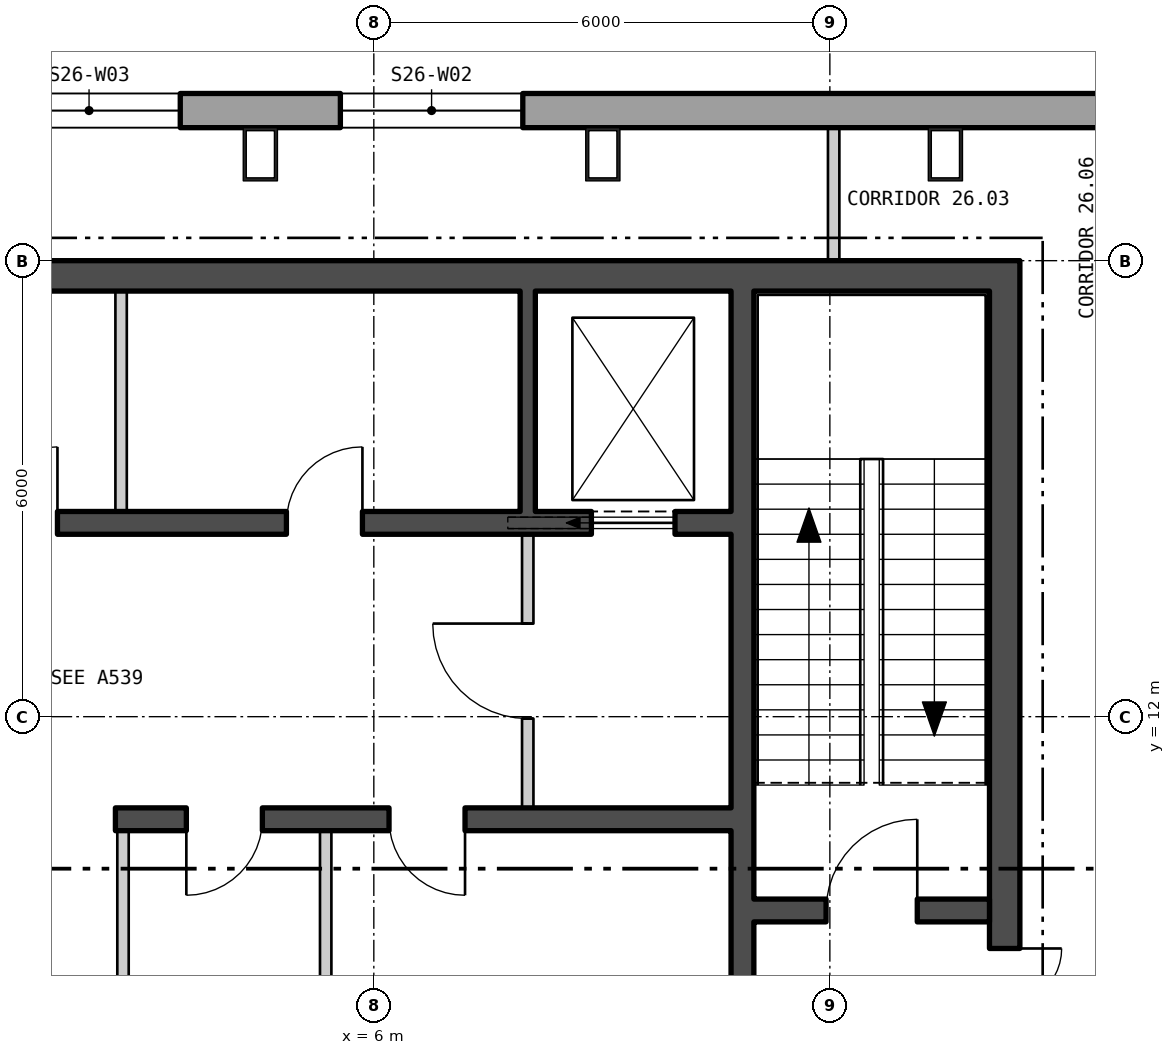
"""IFC4 building model, lengths in metres.
Left out: names, types, materials, properties, quantities, classifications, styles, units other than length and angle.
Written with IfcOpenShell. Run it as: python <this file> out.ifc"""

import sys

from ifc_helpers import new_model, si_unit, direction, frame, frame_2d, origin, origin_2d, place, context, subcontext, project, spatial, polyline, rectangle, hollow_rectangle, outline, extrude, element, fill, save


model = new_model("IFC4")
c1 = context("Model", 3, precision=1e-05, world=origin(), true_north=direction((0.0, 1.0)))
c2 = subcontext(c1, "Body", "Model", "MODEL_VIEW")
j1 = project(units=[si_unit("LENGTHUNIT", "METRE"), si_unit("PLANEANGLEUNIT", "RADIAN")], contexts=[c1])
p1 = place(None, origin())
s1 = spatial("IfcSite", under=j1, at=p1, CompositionType="ELEMENT")
p2 = place(p1, origin())
s2 = spatial("IfcBuilding", under=s1, at=p2, CompositionType="ELEMENT")
p3 = place(p2, frame((0.0, 0.0, 329.4)))
s3 = spatial("IfcBuildingStorey", under=s2, at=p3, CompositionType="ELEMENT", Elevation=329.4)
for number, where, z_axis, x_axis in (
    (1, (13.52, 19.4, 0.0), (0.0, 0.0, 1.0), (-1.0, 0.0, 0.0)),
    (2, (9.013, 19.4, 0.0), (0.0, 0.0, 1.0), (-1.0, 0.0, 0.0)),
    (3, (4.507, 19.4, 0.0), (0.0, 0.0, 1.0), (-1.0, 0.0, 0.0)),
):
    element("IfcColumn", number, at=place(p3, frame(where, z_axis=z_axis, x_axis=x_axis)), inside=s3, PredefinedType="COLUMN", context=c2, shape_type="SweptSolid", body=[
        extrude(hollow_rectangle(XDim=0.45, YDim=0.7, WallThickness=0.04, at=origin_2d()), origin(), (0.0, 0.0, 1.0), 4.2),
    ])
p4 = place(p3, frame((22.865, 19.975, -0.4), z_axis=(0.0, 0.0, 1.0), x_axis=(-1.0, 0.0, 0.0)))
e4 = element("IfcWall", 4, at=p4, inside=s3, PredefinedType="SOLIDWALL", context=c2, shape_type="SweptSolid", body=[
    extrude(outline(polyline([(-0.13, -0.225), (45.86, -0.225), (45.6, 0.225), (0.13, 0.225), (-0.13, -0.225)])), origin(), (0.0, 0.0, 1.0), 4.2),
])
p5 = place(p4, frame((1.424, 0.0, 1.3)))
e5 = element("IfcOpeningElement", 5, at=p5, cuts=e4, PredefinedType="OPENING", context=c2, shape_type="SweptSolid", body=[
    extrude(rectangle(XDim=2.4, YDim=2.3, at=frame_2d((1.2, 1.15))), frame((0.0, 0.235, 0.0), z_axis=(0.0, -1.0, 0.0), x_axis=(1.0, 0.0, 0.0)), (0.0, 0.0, 1.0), 0.47),
])
p6 = place(p4, frame((14.905, 0.0, 1.3)))
e6 = element("IfcOpeningElement", 6, at=p6, cuts=e4, PredefinedType="OPENING", context=c2, shape_type="SweptSolid", body=[
    extrude(rectangle(XDim=2.4, YDim=2.3, at=frame_2d((1.2, 1.15))), frame((0.0, 0.235, 0.0), z_axis=(0.0, -1.0, 0.0), x_axis=(1.0, 0.0, 0.0)), (0.0, 0.0, 1.0), 0.47),
])
p7 = place(p4, frame((19.412, 0.0, 1.3)))
e7 = element("IfcOpeningElement", 7, at=p7, cuts=e4, PredefinedType="OPENING", context=c2, shape_type="SweptSolid", body=[
    extrude(rectangle(XDim=2.4, YDim=2.3, at=frame_2d((1.2, 1.15))), frame((0.0, 0.235, 0.0), z_axis=(0.0, -1.0, 0.0), x_axis=(1.0, 0.0, 0.0)), (0.0, 0.0, 1.0), 0.47),
])
p8 = place(p4, frame((23.918, 0.0, 1.3)))
e8 = element("IfcOpeningElement", 8, at=p8, cuts=e4, PredefinedType="OPENING", context=c2, shape_type="SweptSolid", body=[
    extrude(rectangle(XDim=2.4, YDim=2.3, at=frame_2d((1.2, 1.15))), frame((0.0, 0.235, 0.0), z_axis=(0.0, -1.0, 0.0), x_axis=(1.0, 0.0, 0.0)), (0.0, 0.0, 1.0), 0.47),
])
p9 = place(p4, frame((28.425, 0.0, 1.3)))
e9 = element("IfcOpeningElement", 9, at=p9, cuts=e4, PredefinedType="OPENING", context=c2, shape_type="SweptSolid", body=[
    extrude(rectangle(XDim=2.4, YDim=2.3, at=frame_2d((1.2, 1.15))), frame((0.0, 0.235, 0.0), z_axis=(0.0, -1.0, 0.0), x_axis=(1.0, 0.0, 0.0)), (0.0, 0.0, 1.0), 0.47),
])
p10 = place(p4, frame((32.932, 0.0, 1.3)))
e10 = element("IfcOpeningElement", 10, at=p10, cuts=e4, PredefinedType="OPENING", context=c2, shape_type="SweptSolid", body=[
    extrude(rectangle(XDim=2.4, YDim=2.3, at=frame_2d((1.2, 1.15))), frame((0.0, 0.235, 0.0), z_axis=(0.0, -1.0, 0.0), x_axis=(1.0, 0.0, 0.0)), (0.0, 0.0, 1.0), 0.47),
])
p11 = place(p4, frame((41.907, 0.0, 1.3)))
e11 = element("IfcOpeningElement", 11, at=p11, cuts=e4, PredefinedType="OPENING", context=c2, shape_type="SweptSolid", body=[
    extrude(rectangle(XDim=2.4, YDim=2.3, at=frame_2d((1.2, 1.15))), frame((0.0, 0.235, 0.0), z_axis=(0.0, -1.0, 0.0), x_axis=(1.0, 0.0, 0.0)), (0.0, 0.0, 1.0), 0.47),
])
p12 = place(p3, frame((1.9, -22.92, -0.18), z_axis=(0.0, 0.0, 1.0), x_axis=(0.500000141277, 0.866025322218, 0.0)))
e12 = element("IfcWall", 12, at=p12, inside=s3, PredefinedType="SOLIDWALL", context=c2, shape_type="SweptSolid", body=[
    extrude(outline(polyline([(-0.13, -0.225), (45.86, -0.225), (45.6, 0.225), (0.13, 0.225), (-0.13, -0.225)])), origin(), (0.0, 0.0, 1.0), 3.98),
])
p13 = place(p12, frame((1.424, 0.0, 1.08)))
e13 = element("IfcOpeningElement", 13, at=p13, cuts=e12, PredefinedType="OPENING", context=c2, shape_type="SweptSolid", body=[
    extrude(rectangle(XDim=2.4, YDim=2.3, at=frame_2d((1.2, 1.15))), frame((0.0, 0.235, 0.0), z_axis=(0.0, -1.0, 0.0), x_axis=(1.0, 0.0, 0.0)), (0.0, 0.0, 1.0), 0.47),
])
p14 = place(p12, frame((5.892, 0.0, 1.08)))
e14 = element("IfcOpeningElement", 14, at=p14, cuts=e12, PredefinedType="OPENING", context=c2, shape_type="SweptSolid", body=[
    extrude(rectangle(XDim=2.4, YDim=2.3, at=frame_2d((1.2, 1.15))), frame((0.0, 0.235, 0.0), z_axis=(0.0, -1.0, 0.0), x_axis=(1.0, 0.0, 0.0)), (0.0, 0.0, 1.0), 0.47),
])
p15 = place(p12, frame((14.905, 0.0, 1.08)))
e15 = element("IfcOpeningElement", 15, at=p15, cuts=e12, PredefinedType="OPENING", context=c2, shape_type="SweptSolid", body=[
    extrude(rectangle(XDim=2.4, YDim=2.3, at=frame_2d((1.2, 1.15))), frame((0.0, 0.235, 0.0), z_axis=(0.0, -1.0, 0.0), x_axis=(1.0, 0.0, 0.0)), (0.0, 0.0, 1.0), 0.47),
])
p16 = place(p12, frame((19.412, 0.0, 1.08)))
e16 = element("IfcOpeningElement", 16, at=p16, cuts=e12, PredefinedType="OPENING", context=c2, shape_type="SweptSolid", body=[
    extrude(rectangle(XDim=2.4, YDim=2.3, at=frame_2d((1.2, 1.15))), frame((0.0, 0.235, 0.0), z_axis=(0.0, -1.0, 0.0), x_axis=(1.0, 0.0, 0.0)), (0.0, 0.0, 1.0), 0.47),
])
p17 = place(p12, frame((23.918, 0.0, 1.08)))
e17 = element("IfcOpeningElement", 17, at=p17, cuts=e12, PredefinedType="OPENING", context=c2, shape_type="SweptSolid", body=[
    extrude(rectangle(XDim=2.4, YDim=2.3, at=frame_2d((1.2, 1.15))), frame((0.0, 0.235, 0.0), z_axis=(0.0, -1.0, 0.0), x_axis=(1.0, 0.0, 0.0)), (0.0, 0.0, 1.0), 0.47),
])
p18 = place(p12, frame((32.932, 0.0, 1.08)))
e18 = element("IfcOpeningElement", 18, at=p18, cuts=e12, PredefinedType="OPENING", context=c2, shape_type="SweptSolid", body=[
    extrude(rectangle(XDim=2.4, YDim=2.3, at=frame_2d((1.2, 1.15))), frame((0.0, 0.235, 0.0), z_axis=(0.0, -1.0, 0.0), x_axis=(1.0, 0.0, 0.0)), (0.0, 0.0, 1.0), 0.47),
])
p19 = place(p12, frame((37.438, 0.0, 1.08)))
e19 = element("IfcOpeningElement", 19, at=p19, cuts=e12, PredefinedType="OPENING", context=c2, shape_type="SweptSolid", body=[
    extrude(rectangle(XDim=2.4, YDim=2.3, at=frame_2d((1.2, 1.15))), frame((0.0, 0.235, 0.0), z_axis=(0.0, -1.0, 0.0), x_axis=(1.0, 0.0, 0.0)), (0.0, 0.0, 1.0), 0.47),
])
p20 = place(p12, frame((41.907, 0.0, 1.08)))
e20 = element("IfcOpeningElement", 20, at=p20, cuts=e12, PredefinedType="OPENING", context=c2, shape_type="SweptSolid", body=[
    extrude(rectangle(XDim=2.4, YDim=2.3, at=frame_2d((1.2, 1.15))), frame((0.0, 0.235, 0.0), z_axis=(0.0, -1.0, 0.0), x_axis=(1.0, 0.0, 0.0)), (0.0, 0.0, 1.0), 0.47),
])
p21 = place(p3, frame((-14.5, 17.8, 0.0), z_axis=(0.0, 0.0, 1.0), x_axis=(1.0, 0.0, 0.0)))
e21 = element("IfcWall", 21, at=p21, inside=s3, PredefinedType="SHEAR", context=c2, shape_type="SweptSolid", body=[
    extrude(rectangle(XDim=29.0, YDim=0.4, at=frame_2d((14.5, 0.0))), origin(), (0.0, 0.0, 1.0), 4.0),
])
p22 = place(p3, frame((14.3, 4.4, 0.0), z_axis=(0.0, 0.0, 1.0), x_axis=(0.0, 1.0, 0.0)))
e22 = element("IfcWall", 22, at=p22, inside=s3, PredefinedType="SHEAR", context=c2, shape_type="SweptSolid", body=[
    extrude(rectangle(XDim=13.2, YDim=0.4, at=frame_2d((6.6, 0.0))), origin(), (0.0, 0.0, 1.0), 4.0),
])
p23 = place(p22, frame((3.05, 0.0, 0.0)))
e23 = element("IfcOpeningElement", 23, at=p23, cuts=e22, PredefinedType="OPENING", context=c2, shape_type="SweptSolid", body=[
    extrude(rectangle(XDim=1.5, YDim=2.1, at=frame_2d((0.75, 1.05))), frame((0.0, 0.21, 0.0), z_axis=(0.0, -1.0, 0.0), x_axis=(1.0, 0.0, 0.0)), (0.0, 0.0, 1.0), 0.42),
])
p24 = place(p3, frame((10.85, 4.4, 0.0), z_axis=(0.0, 0.0, 1.0), x_axis=(0.0, 1.0, 0.0)))
e24 = element("IfcWall", 24, at=p24, inside=s3, PredefinedType="SHEAR", context=c2, shape_type="SweptSolid", body=[
    extrude(rectangle(XDim=13.2, YDim=0.3, at=frame_2d((6.6, 0.0))), origin(), (0.0, 0.0, 1.0), 4.0),
])
p25 = place(p24, frame((1.575, 0.0, 0.0)))
e25 = element("IfcOpeningElement", 25, at=p25, cuts=e24, PredefinedType="OPENING", context=c2, shape_type="SweptSolid", body=[
    extrude(rectangle(XDim=1.25, YDim=2.1, at=frame_2d((0.625, 1.05))), frame((0.0, 0.16, 0.0), z_axis=(0.0, -1.0, 0.0), x_axis=(1.0, 0.0, 0.0)), (0.0, 0.0, 1.0), 0.32),
])
p26 = place(p24, frame((0.4, 0.0, 0.0)))
e26 = element("IfcOpeningElement", 26, at=p26, cuts=e24, PredefinedType="OPENING", context=c2, shape_type="SweptSolid", body=[
    extrude(rectangle(XDim=0.9, YDim=2.1, at=frame_2d((0.45, 1.05))), frame((0.0, 0.16, 0.0), z_axis=(0.0, -1.0, 0.0), x_axis=(1.0, 0.0, 0.0)), (0.0, 0.0, 1.0), 0.32),
])
p27 = place(p3, frame((11.0, 9.45, 0.0), z_axis=(0.0, 0.0, 1.0), x_axis=(1.0, 0.0, 0.0)))
e27 = element("IfcWall", 27, at=p27, inside=s3, PredefinedType="SHEAR", context=c2, shape_type="SweptSolid", body=[
    extrude(rectangle(XDim=3.1, YDim=0.3, at=frame_2d((1.55, 0.0))), origin(), (0.0, 0.0, 1.0), 4.0),
])
p28 = place(p27, frame((0.95, 0.0, 0.0)))
e28 = element("IfcOpeningElement", 28, at=p28, cuts=e27, PredefinedType="OPENING", context=c2, shape_type="SweptSolid", body=[
    extrude(rectangle(XDim=1.2, YDim=2.1, at=frame_2d((0.6, 1.05))), frame((0.0, 0.16, 0.0), z_axis=(0.0, -1.0, 0.0), x_axis=(1.0, 0.0, 0.0)), (0.0, 0.0, 1.0), 0.32),
])
p29 = place(p3, frame((-10.7, 14.55, 0.0), z_axis=(0.0, 0.0, 1.0), x_axis=(1.0, 0.0, 0.0)))
e29 = element("IfcWall", 29, at=p29, inside=s3, PredefinedType="SHEAR", context=c2, shape_type="SweptSolid", body=[
    extrude(rectangle(XDim=21.4, YDim=0.3, at=frame_2d((10.7, 0.0))), origin(), (0.0, 0.0, 1.0), 4.0),
])
p30 = place(p29, frame((0.738, 0.0, 0.0)))
e30 = element("IfcOpeningElement", 30, at=p30, cuts=e29, PredefinedType="OPENING", context=c2, shape_type="SweptSolid", body=[
    extrude(rectangle(XDim=1.1, YDim=2.1, at=frame_2d((0.55, 1.05))), frame((0.0, 0.16, 0.0), z_axis=(0.0, -1.0, 0.0), x_axis=(1.0, 0.0, 0.0)), (0.0, 0.0, 1.0), 0.32),
])
p31 = place(p29, frame((3.462, 0.0, 0.0)))
e31 = element("IfcOpeningElement", 31, at=p31, cuts=e29, PredefinedType="OPENING", context=c2, shape_type="SweptSolid", body=[
    extrude(rectangle(XDim=1.1, YDim=2.1, at=frame_2d((0.55, 1.05))), frame((0.0, 0.16, 0.0), z_axis=(0.0, -1.0, 0.0), x_axis=(1.0, 0.0, 0.0)), (0.0, 0.0, 1.0), 0.32),
])
p32 = place(p29, frame((6.138, 0.0, 0.0)))
e32 = element("IfcOpeningElement", 32, at=p32, cuts=e29, PredefinedType="OPENING", context=c2, shape_type="SweptSolid", body=[
    extrude(rectangle(XDim=1.1, YDim=2.1, at=frame_2d((0.55, 1.05))), frame((0.0, 0.16, 0.0), z_axis=(0.0, -1.0, 0.0), x_axis=(1.0, 0.0, 0.0)), (0.0, 0.0, 1.0), 0.32),
])
p33 = place(p29, frame((8.812, 0.0, 0.0)))
e33 = element("IfcOpeningElement", 33, at=p33, cuts=e29, PredefinedType="OPENING", context=c2, shape_type="SweptSolid", body=[
    extrude(rectangle(XDim=1.1, YDim=2.1, at=frame_2d((0.55, 1.05))), frame((0.0, 0.16, 0.0), z_axis=(0.0, -1.0, 0.0), x_axis=(1.0, 0.0, 0.0)), (0.0, 0.0, 1.0), 0.32),
])
p34 = place(p29, frame((19.562, 0.0, 0.0)))
e34 = element("IfcOpeningElement", 34, at=p34, cuts=e29, PredefinedType="OPENING", context=c2, shape_type="SweptSolid", body=[
    extrude(rectangle(XDim=1.1, YDim=2.1, at=frame_2d((0.55, 1.05))), frame((0.0, 0.16, 0.0), z_axis=(0.0, -1.0, 0.0), x_axis=(1.0, 0.0, 0.0)), (0.0, 0.0, 1.0), 0.32),
])
p35 = place(p29, frame((11.537, 0.0, 0.0)))
e35 = element("IfcOpeningElement", 35, at=p35, cuts=e29, PredefinedType="OPENING", context=c2, shape_type="SweptSolid", body=[
    extrude(rectangle(XDim=1.0, YDim=2.1, at=frame_2d((0.5, 1.05))), frame((0.0, 0.16, 0.0), z_axis=(0.0, -1.0, 0.0), x_axis=(1.0, 0.0, 0.0)), (0.0, 0.0, 1.0), 0.32),
])
p36 = place(p29, frame((15.55, 0.0, 0.0)))
e36 = element("IfcOpeningElement", 36, at=p36, cuts=e29, PredefinedType="OPENING", context=c2, shape_type="SweptSolid", body=[
    extrude(rectangle(XDim=1.0, YDim=2.1, at=frame_2d((0.5, 1.05))), frame((0.0, 0.16, 0.0), z_axis=(0.0, -1.0, 0.0), x_axis=(1.0, 0.0, 0.0)), (0.0, 0.0, 1.0), 0.32),
])
p37 = place(p3, frame((2.6, 10.65, 0.0), z_axis=(0.0, 0.0, 1.0), x_axis=(1.0, 0.0, 0.0)))
e37 = element("IfcWall", 37, at=p37, inside=s3, PredefinedType="SHEAR", context=c2, shape_type="SweptSolid", body=[
    extrude(rectangle(XDim=8.1, YDim=0.3, at=frame_2d((4.05, 0.0))), origin(), (0.0, 0.0, 1.0), 4.0),
])
p38 = place(p37, frame((0.933, 0.0, 0.0)))
e38 = element("IfcOpeningElement", 38, at=p38, cuts=e37, PredefinedType="OPENING", context=c2, shape_type="SweptSolid", body=[
    extrude(rectangle(XDim=1.0, YDim=2.1, at=frame_2d((0.5, 1.05))), frame((0.0, 0.16, 0.0), z_axis=(0.0, -1.0, 0.0), x_axis=(1.0, 0.0, 0.0)), (0.0, 0.0, 1.0), 0.32),
])
p39 = place(p37, frame((3.6, 0.0, 0.0)))
e39 = element("IfcOpeningElement", 39, at=p39, cuts=e37, PredefinedType="OPENING", context=c2, shape_type="SweptSolid", body=[
    extrude(rectangle(XDim=1.0, YDim=2.1, at=frame_2d((0.5, 1.05))), frame((0.0, 0.16, 0.0), z_axis=(0.0, -1.0, 0.0), x_axis=(1.0, 0.0, 0.0)), (0.0, 0.0, 1.0), 0.32),
])
p40 = place(p3, frame((2.675, 14.7, 0.0), z_axis=(0.0, 0.0, 1.0), x_axis=(0.0, 1.0, 0.0)))
e40 = element("IfcWall", 40, at=p40, inside=s3, PredefinedType="PARTITIONING", context=c2, shape_type="SweptSolid", body=[
    extrude(rectangle(XDim=2.9, YDim=0.15, at=frame_2d((1.45, 0.0))), origin(), (0.0, 0.0, 1.0), 4.0),
])
p41 = place(p3, frame((8.025, 14.7, 0.0), z_axis=(0.0, 0.0, 1.0), x_axis=(0.0, 1.0, 0.0)))
e41 = element("IfcWall", 41, at=p41, inside=s3, PredefinedType="SHEAR", context=c2, shape_type="SweptSolid", body=[
    extrude(rectangle(XDim=2.9, YDim=0.2, at=frame_2d((1.45, 0.0))), origin(), (0.0, 0.0, 1.0), 4.0),
])
for number, where, z_axis, x_axis in (
    (42, (2.7, 7.8, 0.0), (0.0, 0.0, 1.0), (0.0, 1.0, 0.0)),
    (43, (5.367, 7.8, 0.0), (0.0, 0.0, 1.0), (0.0, 1.0, 0.0)),
):
    element("IfcWall", number, at=place(p3, frame(where, z_axis=z_axis, x_axis=x_axis)), inside=s3, PredefinedType="PARTITIONING", context=c2, shape_type="SweptSolid", body=[
        extrude(rectangle(XDim=2.7, YDim=0.15, at=frame_2d((1.35, 0.0))), origin(), (0.0, 0.0, 1.0), 4.0),
    ])
p42 = place(p3, frame((8.025, 10.8, 0.0), z_axis=(0.0, 0.0, 1.0), x_axis=(0.0, 1.0, 0.0)))
e44 = element("IfcWall", 44, at=p42, inside=s3, PredefinedType="PARTITIONING", context=c2, shape_type="SweptSolid", body=[
    extrude(rectangle(XDim=3.6, YDim=0.15, at=frame_2d((1.8, 0.0))), origin(), (0.0, 0.0, 1.0), 4.0),
])
p43 = place(p42, frame((1.175, 0.0, 0.0)))
e45 = element("IfcOpeningElement", 45, at=p43, cuts=e44, PredefinedType="OPENING", context=c2, shape_type="SweptSolid", body=[
    extrude(rectangle(XDim=1.25, YDim=2.1, at=frame_2d((0.625, 1.05))), frame((0.0, 0.085, 0.0), z_axis=(0.0, -1.0, 0.0), x_axis=(1.0, 0.0, 0.0)), (0.0, 0.0, 1.0), 0.17),
])
p44 = place(p3, frame((12.05, 18.0, 0.0), z_axis=(0.0, 0.0, 1.0), x_axis=(0.0, 1.0, 0.0)))
e46 = element("IfcWall", 46, at=p44, inside=s3, PredefinedType="PARTITIONING", context=c2, shape_type="SweptSolid", body=[
    extrude(rectangle(XDim=1.75, YDim=0.15, at=frame_2d((0.875, 0.0))), origin(), (0.0, 0.0, 1.0), 4.0),
])
p45 = place(p6, origin())
e47 = element("IfcWindow", 47, at=p45, inside=s3, PartitioningType="SINGLE_PANEL", PredefinedType="WINDOW", context=c2, shape_type="SweptSolid", body=[
    extrude(rectangle(XDim=2.4, YDim=2.3, at=frame_2d((1.2, 1.15))), frame((0.0, 0.105, 0.0), z_axis=(0.0, -1.0, 0.0), x_axis=(1.0, 0.0, 0.0)), (0.0, 0.0, 1.0), 0.06),
])
fill(e6, e47)
p46 = place(p7, origin())
e48 = element("IfcWindow", 48, at=p46, inside=s3, PartitioningType="SINGLE_PANEL", PredefinedType="WINDOW", context=c2, shape_type="SweptSolid", body=[
    extrude(rectangle(XDim=2.4, YDim=2.3, at=frame_2d((1.2, 1.15))), frame((0.0, 0.105, 0.0), z_axis=(0.0, -1.0, 0.0), x_axis=(1.0, 0.0, 0.0)), (0.0, 0.0, 1.0), 0.06),
])
fill(e7, e48)
p47 = place(p34, origin())
e49 = element("IfcDoor", 49, at=p47, inside=s3, OperationType="SLIDING_TO_LEFT", PredefinedType="DOOR", context=c2, shape_type="SweptSolid", body=[
    extrude(rectangle(XDim=1.1, YDim=2.1, at=frame_2d((0.55, 1.05))), frame((0.0, 0.025, 0.0), z_axis=(0.0, -1.0, 0.0), x_axis=(1.0, 0.0, 0.0)), (0.0, 0.0, 1.0), 0.05),
])
fill(e34, e49)
p48 = place(p35, origin())
e50 = element("IfcDoor", 50, at=p48, inside=s3, OperationType="SINGLE_SWING_LEFT", PredefinedType="DOOR", context=c2, shape_type="SweptSolid", body=[
    extrude(rectangle(XDim=1.0, YDim=2.1, at=frame_2d((0.5, 1.05))), frame((0.0, 0.025, 0.0), z_axis=(0.0, -1.0, 0.0), x_axis=(1.0, 0.0, 0.0)), (0.0, 0.0, 1.0), 0.05),
])
fill(e35, e50)
p49 = place(p36, origin())
e51 = element("IfcDoor", 51, at=p49, inside=s3, OperationType="SINGLE_SWING_LEFT", PredefinedType="DOOR", context=c2, shape_type="SweptSolid", body=[
    extrude(rectangle(XDim=1.0, YDim=2.1, at=frame_2d((0.5, 1.05))), frame((0.0, 0.025, 0.0), z_axis=(0.0, -1.0, 0.0), x_axis=(1.0, 0.0, 0.0)), (0.0, 0.0, 1.0), 0.05),
])
fill(e36, e51)
p50 = place(p38, origin())
e52 = element("IfcDoor", 52, at=p50, inside=s3, OperationType="SINGLE_SWING_LEFT", PredefinedType="DOOR", context=c2, shape_type="SweptSolid", body=[
    extrude(rectangle(XDim=1.0, YDim=2.1, at=frame_2d((0.5, 1.05))), frame((0.0, 0.025, 0.0), z_axis=(0.0, -1.0, 0.0), x_axis=(1.0, 0.0, 0.0)), (0.0, 0.0, 1.0), 0.05),
])
fill(e38, e52)
p51 = place(p39, origin())
e53 = element("IfcDoor", 53, at=p51, inside=s3, OperationType="SINGLE_SWING_RIGHT", PredefinedType="DOOR", context=c2, shape_type="SweptSolid", body=[
    extrude(rectangle(XDim=1.0, YDim=2.1, at=frame_2d((0.5, 1.05))), frame((0.0, 0.025, 0.0), z_axis=(0.0, -1.0, 0.0), x_axis=(1.0, 0.0, 0.0)), (0.0, 0.0, 1.0), 0.05),
])
fill(e39, e53)
p52 = place(p43, origin())
e54 = element("IfcDoor", 54, at=p52, inside=s3, OperationType="SINGLE_SWING_LEFT", PredefinedType="DOOR", context=c2, shape_type="SweptSolid", body=[
    extrude(rectangle(XDim=1.25, YDim=2.1, at=frame_2d((0.625, 1.05))), frame((0.0, 0.025, 0.0), z_axis=(0.0, -1.0, 0.0), x_axis=(1.0, 0.0, 0.0)), (0.0, 0.0, 1.0), 0.05),
])
fill(e45, e54)
p53 = place(p28, origin())
e55 = element("IfcDoor", 55, at=p53, inside=s3, OperationType="SINGLE_SWING_LEFT", PredefinedType="DOOR", context=c2, shape_type="SweptSolid", body=[
    extrude(rectangle(XDim=1.2, YDim=2.1, at=frame_2d((0.6, 1.05))), frame((0.0, 0.025, 0.0), z_axis=(0.0, -1.0, 0.0), x_axis=(1.0, 0.0, 0.0)), (0.0, 0.0, 1.0), 0.05),
])
fill(e28, e55)
p54 = place(p23, origin())
e56 = element("IfcDoor", 56, at=p54, inside=s3, OperationType="DOUBLE_DOOR_SINGLE_SWING", PredefinedType="DOOR", context=c2, shape_type="SweptSolid", body=[
    extrude(rectangle(XDim=1.5, YDim=2.1, at=frame_2d((0.75, 1.05))), frame((0.0, 0.025, 0.0), z_axis=(0.0, -1.0, 0.0), x_axis=(1.0, 0.0, 0.0)), (0.0, 0.0, 1.0), 0.05),
])
fill(e23, e56)
save(model, sys.argv[1])
